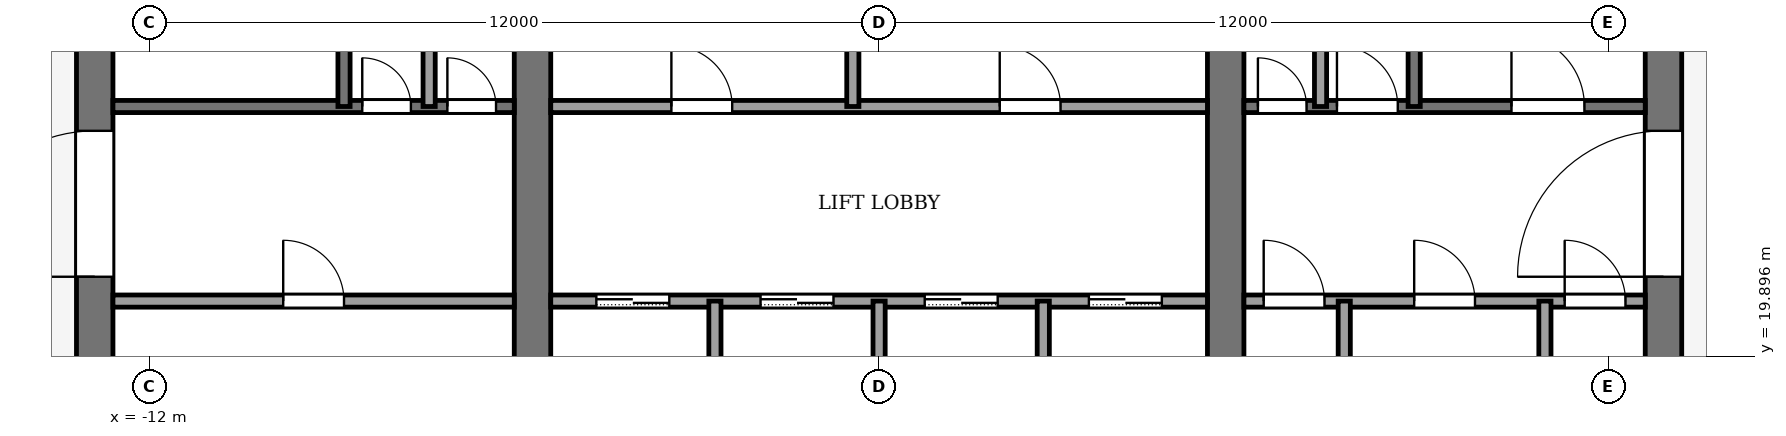
"""IFC4 building model, lengths in metres.
Left out: names, types, materials, properties, quantities, classifications, styles, units other than length and angle.
Written with IfcOpenShell. Run it as: python <this file> out.ifc"""

import sys

from ifc_helpers import new_model, si_unit, direction, frame, frame_2d, origin, place, context, subcontext, project, spatial, rectangle, extrude, element, fill, save


model = new_model("IFC4")
c1 = context("Model", 3, precision=1e-05, world=origin(), true_north=direction((0.0, 1.0)))
c2 = subcontext(c1, "Body", "Model", "MODEL_VIEW")
j1 = project(units=[si_unit("LENGTHUNIT", "METRE"), si_unit("PLANEANGLEUNIT", "RADIAN")], contexts=[c1])
p1 = place(None, origin())
s1 = spatial("IfcSite", under=j1, at=p1, CompositionType="ELEMENT")
p2 = place(p1, origin())
s2 = spatial("IfcBuilding", under=s1, at=p2, CompositionType="ELEMENT")
p3 = place(p2, frame((0.0, 0.0, 322.0)))
s3 = spatial("IfcBuildingStorey", under=s2, at=p3, CompositionType="ELEMENT", Elevation=322.0)
p4 = place(p3, frame((-12.9, 18.4, -0.13), z_axis=(0.0, 0.0, 1.0), x_axis=(0.0, 1.0, 0.0)))
e1 = element("IfcWall", 1, at=p4, inside=s3, PredefinedType="SHEAR", context=c2, shape_type="SweptSolid", body=[
    extrude(rectangle(XDim=19.2, YDim=0.6, at=frame_2d((9.6, 0.0))), origin(), (0.0, 0.0, 1.0), 4.0),
])
p5 = place(p4, frame((2.8, 0.0, 0.13)))
e2 = element("IfcOpeningElement", 2, at=p5, cuts=e1, PredefinedType="OPENING", context=c2, shape_type="SweptSolid", body=[
    extrude(rectangle(XDim=2.4, YDim=2.4, at=frame_2d((1.2, 1.2))), frame((0.0, 0.31, 0.0), z_axis=(0.0, -1.0, 0.0), x_axis=(1.0, 0.0, 0.0)), (0.0, 0.0, 1.0), 0.62),
])
p6 = place(p4, frame((13.4, 0.0, 0.13)))
e3 = element("IfcOpeningElement", 3, at=p6, cuts=e1, PredefinedType="OPENING", context=c2, shape_type="SweptSolid", body=[
    extrude(rectangle(XDim=1.4, YDim=2.2, at=frame_2d((0.7, 1.1))), frame((0.0, 0.31, 0.0), z_axis=(0.0, -1.0, 0.0), x_axis=(1.0, 0.0, 0.0)), (0.0, 0.0, 1.0), 0.62),
])
p7 = place(p3, frame((12.9, 18.4, -0.13), z_axis=(0.0, 0.0, 1.0), x_axis=(0.0, 1.0, 0.0)))
e4 = element("IfcWall", 4, at=p7, inside=s3, PredefinedType="SHEAR", context=c2, shape_type="SweptSolid", body=[
    extrude(rectangle(XDim=19.2, YDim=0.6, at=frame_2d((9.6, 0.0))), origin(), (0.0, 0.0, 1.0), 4.0),
])
p8 = place(p7, frame((2.8, 0.0, 0.13)))
e5 = element("IfcOpeningElement", 5, at=p8, cuts=e4, PredefinedType="OPENING", context=c2, shape_type="SweptSolid", body=[
    extrude(rectangle(XDim=2.4, YDim=2.4, at=frame_2d((1.2, 1.2))), frame((0.0, 0.31, 0.0), z_axis=(0.0, -1.0, 0.0), x_axis=(1.0, 0.0, 0.0)), (0.0, 0.0, 1.0), 0.62),
])
p9 = place(p7, frame((13.3, 0.0, 0.13)))
e6 = element("IfcOpeningElement", 6, at=p9, cuts=e4, PredefinedType="OPENING", context=c2, shape_type="SweptSolid", body=[
    extrude(rectangle(XDim=2.4, YDim=2.4, at=frame_2d((1.2, 1.2))), frame((0.0, 0.31, 0.0), z_axis=(0.0, -1.0, 0.0), x_axis=(1.0, 0.0, 0.0)), (0.0, 0.0, 1.0), 0.62),
])
p10 = place(p3, frame((-5.7, 18.4, -0.13), z_axis=(0.0, 0.0, 1.0), x_axis=(0.0, 1.0, 0.0)))
e7 = element("IfcWall", 7, at=p10, inside=s3, PredefinedType="SHEAR", context=c2, shape_type="SweptSolid", body=[
    extrude(rectangle(XDim=19.2, YDim=0.6, at=frame_2d((9.6, 0.0))), origin(), (0.0, 0.0, 1.0), 4.0),
])
p11 = place(p10, frame((8.35, 0.0, 0.13)))
e8 = element("IfcOpeningElement", 8, at=p11, cuts=e7, PredefinedType="OPENING", context=c2, shape_type="SweptSolid", body=[
    extrude(rectangle(XDim=0.9, YDim=2.1, at=frame_2d((0.45, 1.05))), frame((0.0, 0.31, 0.0), z_axis=(0.0, -1.0, 0.0), x_axis=(1.0, 0.0, 0.0)), (0.0, 0.0, 1.0), 0.62),
])
p12 = place(p3, frame((5.7, 18.4, -0.13), z_axis=(0.0, 0.0, 1.0), x_axis=(0.0, 1.0, 0.0)))
e9 = element("IfcWall", 9, at=p12, inside=s3, PredefinedType="SHEAR", context=c2, shape_type="SweptSolid", body=[
    extrude(rectangle(XDim=19.2, YDim=0.6, at=frame_2d((9.6, 0.0))), origin(), (0.0, 0.0, 1.0), 4.0),
])
p13 = place(p12, frame((13.3, 0.0, 0.13)))
e10 = element("IfcOpeningElement", 10, at=p13, cuts=e9, PredefinedType="OPENING", context=c2, shape_type="SweptSolid", body=[
    extrude(rectangle(XDim=2.4, YDim=2.4, at=frame_2d((1.2, 1.2))), frame((0.0, 0.31, 0.0), z_axis=(0.0, -1.0, 0.0), x_axis=(1.0, 0.0, 0.0)), (0.0, 0.0, 1.0), 0.62),
])
p14 = place(p3, frame((-12.6, 20.8, 0.0), z_axis=(0.0, 0.0, 1.0), x_axis=(1.0, 0.0, 0.0)))
e11 = element("IfcWall", 11, at=p14, inside=s3, PredefinedType="PARTITIONING", context=c2, shape_type="SweptSolid", body=[
    extrude(rectangle(XDim=6.6, YDim=0.2, at=frame_2d((3.3, 0.0))), origin(), (0.0, 0.0, 1.0), 3.87),
])
p15 = place(p14, frame((2.8, 0.0, 0.0)))
e12 = element("IfcOpeningElement", 12, at=p15, cuts=e11, PredefinedType="OPENING", context=c2, shape_type="SweptSolid", body=[
    extrude(rectangle(XDim=1.0, YDim=2.1, at=frame_2d((0.5, 1.05))), frame((0.0, 0.11, 0.0), z_axis=(0.0, -1.0, 0.0), x_axis=(1.0, 0.0, 0.0)), (0.0, 0.0, 1.0), 0.22),
])
p16 = place(p3, frame((-5.4, 20.8, 0.0), z_axis=(0.0, 0.0, 1.0), x_axis=(1.0, 0.0, 0.0)))
e13 = element("IfcWall", 13, at=p16, inside=s3, PredefinedType="PARTITIONING", context=c2, shape_type="SweptSolid", body=[
    extrude(rectangle(XDim=10.8, YDim=0.2, at=frame_2d((5.4, 0.0))), origin(), (0.0, 0.0, 1.0), 3.87),
])
p17 = place(p16, frame((0.75, 0.0, 0.0)))
e14 = element("IfcOpeningElement", 14, at=p17, cuts=e13, PredefinedType="OPENING", context=c2, shape_type="SweptSolid", body=[
    extrude(rectangle(XDim=1.2, YDim=2.2, at=frame_2d((0.6, 1.1))), frame((0.0, 0.11, 0.0), z_axis=(0.0, -1.0, 0.0), x_axis=(1.0, 0.0, 0.0)), (0.0, 0.0, 1.0), 0.22),
])
p18 = place(p16, frame((3.45, 0.0, 0.0)))
e15 = element("IfcOpeningElement", 15, at=p18, cuts=e13, PredefinedType="OPENING", context=c2, shape_type="SweptSolid", body=[
    extrude(rectangle(XDim=1.2, YDim=2.2, at=frame_2d((0.6, 1.1))), frame((0.0, 0.11, 0.0), z_axis=(0.0, -1.0, 0.0), x_axis=(1.0, 0.0, 0.0)), (0.0, 0.0, 1.0), 0.22),
])
p19 = place(p16, frame((6.15, 0.0, 0.0)))
e16 = element("IfcOpeningElement", 16, at=p19, cuts=e13, PredefinedType="OPENING", context=c2, shape_type="SweptSolid", body=[
    extrude(rectangle(XDim=1.2, YDim=2.2, at=frame_2d((0.6, 1.1))), frame((0.0, 0.11, 0.0), z_axis=(0.0, -1.0, 0.0), x_axis=(1.0, 0.0, 0.0)), (0.0, 0.0, 1.0), 0.22),
])
p20 = place(p16, frame((8.85, 0.0, 0.0)))
e17 = element("IfcOpeningElement", 17, at=p20, cuts=e13, PredefinedType="OPENING", context=c2, shape_type="SweptSolid", body=[
    extrude(rectangle(XDim=1.2, YDim=2.2, at=frame_2d((0.6, 1.1))), frame((0.0, 0.11, 0.0), z_axis=(0.0, -1.0, 0.0), x_axis=(1.0, 0.0, 0.0)), (0.0, 0.0, 1.0), 0.22),
])
p21 = place(p3, frame((6.0, 20.8, 0.0), z_axis=(0.0, 0.0, 1.0), x_axis=(1.0, 0.0, 0.0)))
e18 = element("IfcWall", 18, at=p21, inside=s3, PredefinedType="PARTITIONING", context=c2, shape_type="SweptSolid", body=[
    extrude(rectangle(XDim=6.6, YDim=0.2, at=frame_2d((3.3, 0.0))), origin(), (0.0, 0.0, 1.0), 3.87),
])
p22 = place(p21, frame((0.325, 0.0, 0.0)))
e19 = element("IfcOpeningElement", 19, at=p22, cuts=e18, PredefinedType="OPENING", context=c2, shape_type="SweptSolid", body=[
    extrude(rectangle(XDim=1.0, YDim=2.1, at=frame_2d((0.5, 1.05))), frame((0.0, 0.11, 0.0), z_axis=(0.0, -1.0, 0.0), x_axis=(1.0, 0.0, 0.0)), (0.0, 0.0, 1.0), 0.22),
])
p23 = place(p21, frame((2.8, 0.0, 0.0)))
e20 = element("IfcOpeningElement", 20, at=p23, cuts=e18, PredefinedType="OPENING", context=c2, shape_type="SweptSolid", body=[
    extrude(rectangle(XDim=1.0, YDim=2.1, at=frame_2d((0.5, 1.05))), frame((0.0, 0.11, 0.0), z_axis=(0.0, -1.0, 0.0), x_axis=(1.0, 0.0, 0.0)), (0.0, 0.0, 1.0), 0.22),
])
p24 = place(p21, frame((5.275, 0.0, 0.0)))
e21 = element("IfcOpeningElement", 21, at=p24, cuts=e18, PredefinedType="OPENING", context=c2, shape_type="SweptSolid", body=[
    extrude(rectangle(XDim=1.0, YDim=2.1, at=frame_2d((0.5, 1.05))), frame((0.0, 0.11, 0.0), z_axis=(0.0, -1.0, 0.0), x_axis=(1.0, 0.0, 0.0)), (0.0, 0.0, 1.0), 0.22),
])
p25 = place(p3, frame((-12.6, 24.0, 0.0), z_axis=(0.0, 0.0, 1.0), x_axis=(1.0, 0.0, 0.0)))
e22 = element("IfcWall", 22, at=p25, inside=s3, PredefinedType="PARTITIONING", context=c2, shape_type="SweptSolid", body=[
    extrude(rectangle(XDim=6.6, YDim=0.2, at=frame_2d((3.3, 0.0))), origin(), (0.0, 0.0, 1.0), 3.87),
])
p26 = place(p25, frame((4.1, 0.0, 0.0)))
e23 = element("IfcOpeningElement", 23, at=p26, cuts=e22, PredefinedType="OPENING", context=c2, shape_type="SweptSolid", body=[
    extrude(rectangle(XDim=0.8, YDim=2.1, at=frame_2d((0.4, 1.05))), frame((0.0, 0.11, 0.0), z_axis=(0.0, -1.0, 0.0), x_axis=(1.0, 0.0, 0.0)), (0.0, 0.0, 1.0), 0.22),
])
p27 = place(p25, frame((5.5, 0.0, 0.0)))
e24 = element("IfcOpeningElement", 24, at=p27, cuts=e22, PredefinedType="OPENING", context=c2, shape_type="SweptSolid", body=[
    extrude(rectangle(XDim=0.8, YDim=2.1, at=frame_2d((0.4, 1.05))), frame((0.0, 0.11, 0.0), z_axis=(0.0, -1.0, 0.0), x_axis=(1.0, 0.0, 0.0)), (0.0, 0.0, 1.0), 0.22),
])
p28 = place(p3, frame((-5.4, 24.0, 0.0), z_axis=(0.0, 0.0, 1.0), x_axis=(1.0, 0.0, 0.0)))
e25 = element("IfcWall", 25, at=p28, inside=s3, PredefinedType="PARTITIONING", context=c2, shape_type="SweptSolid", body=[
    extrude(rectangle(XDim=10.8, YDim=0.2, at=frame_2d((5.4, 0.0))), origin(), (0.0, 0.0, 1.0), 3.87),
])
p29 = place(p28, frame((1.984, 0.0, 0.0)))
e26 = element("IfcOpeningElement", 26, at=p29, cuts=e25, PredefinedType="OPENING", context=c2, shape_type="SweptSolid", body=[
    extrude(rectangle(XDim=1.0, YDim=2.1, at=frame_2d((0.5, 1.05))), frame((0.0, 0.11, 0.0), z_axis=(0.0, -1.0, 0.0), x_axis=(1.0, 0.0, 0.0)), (0.0, 0.0, 1.0), 0.22),
])
p30 = place(p28, frame((7.384, 0.0, 0.0)))
e27 = element("IfcOpeningElement", 27, at=p30, cuts=e25, PredefinedType="OPENING", context=c2, shape_type="SweptSolid", body=[
    extrude(rectangle(XDim=1.0, YDim=2.1, at=frame_2d((0.5, 1.05))), frame((0.0, 0.11, 0.0), z_axis=(0.0, -1.0, 0.0), x_axis=(1.0, 0.0, 0.0)), (0.0, 0.0, 1.0), 0.22),
])
p31 = place(p3, frame((6.0, 24.0, 0.0), z_axis=(0.0, 0.0, 1.0), x_axis=(1.0, 0.0, 0.0)))
e28 = element("IfcWall", 28, at=p31, inside=s3, PredefinedType="PARTITIONING", context=c2, shape_type="SweptSolid", body=[
    extrude(rectangle(XDim=6.6, YDim=0.2, at=frame_2d((3.3, 0.0))), origin(), (0.0, 0.0, 1.0), 3.87),
])
p32 = place(p31, frame((0.23, 0.0, 0.0)))
e29 = element("IfcOpeningElement", 29, at=p32, cuts=e28, PredefinedType="OPENING", context=c2, shape_type="SweptSolid", body=[
    extrude(rectangle(XDim=0.8, YDim=2.1, at=frame_2d((0.4, 1.05))), frame((0.0, 0.11, 0.0), z_axis=(0.0, -1.0, 0.0), x_axis=(1.0, 0.0, 0.0)), (0.0, 0.0, 1.0), 0.22),
])
p33 = place(p31, frame((1.53, 0.0, 0.0)))
e30 = element("IfcOpeningElement", 30, at=p33, cuts=e28, PredefinedType="OPENING", context=c2, shape_type="SweptSolid", body=[
    extrude(rectangle(XDim=1.0, YDim=2.1, at=frame_2d((0.5, 1.05))), frame((0.0, 0.11, 0.0), z_axis=(0.0, -1.0, 0.0), x_axis=(1.0, 0.0, 0.0)), (0.0, 0.0, 1.0), 0.22),
])
p34 = place(p31, frame((4.4, 0.0, 0.0)))
e31 = element("IfcOpeningElement", 31, at=p34, cuts=e28, PredefinedType="OPENING", context=c2, shape_type="SweptSolid", body=[
    extrude(rectangle(XDim=1.2, YDim=2.2, at=frame_2d((0.6, 1.1))), frame((0.0, 0.11, 0.0), z_axis=(0.0, -1.0, 0.0), x_axis=(1.0, 0.0, 0.0)), (0.0, 0.0, 1.0), 0.22),
])
for number, where, z_axis, x_axis in (
    (32, (-8.8, 24.0, 0.0), (0.0, 0.0, 1.0), (0.0, 1.0, 0.0)),
    (33, (-7.4, 24.0, 0.0), (0.0, 0.0, 1.0), (0.0, 1.0, 0.0)),
):
    element("IfcWall", number, at=place(p3, frame(where, z_axis=z_axis, x_axis=x_axis)), inside=s3, PredefinedType="PARTITIONING", context=c2, shape_type="SweptSolid", body=[
        extrude(rectangle(XDim=7.4, YDim=0.2, at=frame_2d((3.7, 0.0))), origin(), (0.0, 0.0, 1.0), 3.87),
    ])
p35 = place(p3, frame((-2.7, 18.4, 0.0), z_axis=(0.0, 0.0, 1.0), x_axis=(0.0, 1.0, 0.0)))
e34 = element("IfcWall", 34, at=p35, inside=s3, PredefinedType="PARTITIONING", context=c2, shape_type="SweptSolid", body=[
    extrude(rectangle(XDim=2.4, YDim=0.2, at=frame_2d((1.2, 0.0))), origin(), (0.0, 0.0, 1.0), 3.87),
])
p36 = place(p3, frame((-0.432, 24.0, 0.0), z_axis=(0.0, 0.0, 1.0), x_axis=(0.0, 1.0, 0.0)))
e35 = element("IfcWall", 35, at=p36, inside=s3, PredefinedType="PARTITIONING", context=c2, shape_type="SweptSolid", body=[
    extrude(rectangle(XDim=2.4, YDim=0.2, at=frame_2d((1.2, 0.0))), origin(), (0.0, 0.0, 1.0), 3.87),
])
for number, where, z_axis, x_axis in (
    (36, (0.0, 18.4, 0.0), (0.0, 0.0, 1.0), (0.0, 1.0, 0.0)),
    (37, (2.7, 18.4, 0.0), (0.0, 0.0, 1.0), (0.0, 1.0, 0.0)),
):
    element("IfcWall", number, at=place(p3, frame(where, z_axis=z_axis, x_axis=x_axis)), inside=s3, PredefinedType="PARTITIONING", context=c2, shape_type="SweptSolid", body=[
        extrude(rectangle(XDim=2.4, YDim=0.2, at=frame_2d((1.2, 0.0))), origin(), (0.0, 0.0, 1.0), 3.87),
    ])
p37 = place(p3, frame((7.26, 24.0, 0.0), z_axis=(0.0, 0.0, 1.0), x_axis=(0.0, 1.0, 0.0)))
e38 = element("IfcWall", 38, at=p37, inside=s3, PredefinedType="PARTITIONING", context=c2, shape_type="SweptSolid", body=[
    extrude(rectangle(XDim=7.4, YDim=0.2, at=frame_2d((3.7, 0.0))), origin(), (0.0, 0.0, 1.0), 3.87),
])
p38 = place(p3, frame((7.65, 18.4, 0.0), z_axis=(0.0, 0.0, 1.0), x_axis=(0.0, 1.0, 0.0)))
e39 = element("IfcWall", 39, at=p38, inside=s3, PredefinedType="PARTITIONING", context=c2, shape_type="SweptSolid", body=[
    extrude(rectangle(XDim=2.4, YDim=0.2, at=frame_2d((1.2, 0.0))), origin(), (0.0, 0.0, 1.0), 3.87),
])
p39 = place(p3, frame((8.8, 24.0, 0.0), z_axis=(0.0, 0.0, 1.0), x_axis=(0.0, 1.0, 0.0)))
e40 = element("IfcWall", 40, at=p39, inside=s3, PredefinedType="PARTITIONING", context=c2, shape_type="SweptSolid", body=[
    extrude(rectangle(XDim=7.4, YDim=0.2, at=frame_2d((3.7, 0.0))), origin(), (0.0, 0.0, 1.0), 3.87),
])
p40 = place(p3, frame((10.95, 18.4, 0.0), z_axis=(0.0, 0.0, 1.0), x_axis=(0.0, 1.0, 0.0)))
e41 = element("IfcWall", 41, at=p40, inside=s3, PredefinedType="PARTITIONING", context=c2, shape_type="SweptSolid", body=[
    extrude(rectangle(XDim=2.4, YDim=0.2, at=frame_2d((1.2, 0.0))), origin(), (0.0, 0.0, 1.0), 3.87),
])
p41 = place(p17, origin())
e42 = element("IfcDoor", 42, at=p41, inside=s3, OperationType="SLIDING_TO_LEFT", PredefinedType="DOOR", context=c2, shape_type="SweptSolid", body=[
    extrude(rectangle(XDim=1.2, YDim=2.2, at=frame_2d((0.6, 1.1))), frame((0.0, 0.025, 0.0), z_axis=(0.0, -1.0, 0.0), x_axis=(1.0, 0.0, 0.0)), (0.0, 0.0, 1.0), 0.05),
])
fill(e14, e42)
p42 = place(p18, origin())
e43 = element("IfcDoor", 43, at=p42, inside=s3, OperationType="SLIDING_TO_LEFT", PredefinedType="DOOR", context=c2, shape_type="SweptSolid", body=[
    extrude(rectangle(XDim=1.2, YDim=2.2, at=frame_2d((0.6, 1.1))), frame((0.0, 0.025, 0.0), z_axis=(0.0, -1.0, 0.0), x_axis=(1.0, 0.0, 0.0)), (0.0, 0.0, 1.0), 0.05),
])
fill(e15, e43)
p43 = place(p19, origin())
e44 = element("IfcDoor", 44, at=p43, inside=s3, OperationType="SLIDING_TO_LEFT", PredefinedType="DOOR", context=c2, shape_type="SweptSolid", body=[
    extrude(rectangle(XDim=1.2, YDim=2.2, at=frame_2d((0.6, 1.1))), frame((0.0, 0.025, 0.0), z_axis=(0.0, -1.0, 0.0), x_axis=(1.0, 0.0, 0.0)), (0.0, 0.0, 1.0), 0.05),
])
fill(e16, e44)
p44 = place(p20, origin())
e45 = element("IfcDoor", 45, at=p44, inside=s3, OperationType="SLIDING_TO_LEFT", PredefinedType="DOOR", context=c2, shape_type="SweptSolid", body=[
    extrude(rectangle(XDim=1.2, YDim=2.2, at=frame_2d((0.6, 1.1))), frame((0.0, 0.025, 0.0), z_axis=(0.0, -1.0, 0.0), x_axis=(1.0, 0.0, 0.0)), (0.0, 0.0, 1.0), 0.05),
])
fill(e17, e45)
p45 = place(p29, origin())
e46 = element("IfcDoor", 46, at=p45, inside=s3, OperationType="SINGLE_SWING_LEFT", PredefinedType="DOOR", context=c2, shape_type="SweptSolid", body=[
    extrude(rectangle(XDim=1.0, YDim=2.1, at=frame_2d((0.5, 1.05))), frame((0.0, 0.025, 0.0), z_axis=(0.0, -1.0, 0.0), x_axis=(1.0, 0.0, 0.0)), (0.0, 0.0, 1.0), 0.05),
])
fill(e26, e46)
p46 = place(p30, origin())
e47 = element("IfcDoor", 47, at=p46, inside=s3, OperationType="SINGLE_SWING_RIGHT", PredefinedType="DOOR", context=c2, shape_type="SweptSolid", body=[
    extrude(rectangle(XDim=1.0, YDim=2.1, at=frame_2d((0.5, 1.05))), frame((0.0, 0.025, 0.0), z_axis=(0.0, -1.0, 0.0), x_axis=(1.0, 0.0, 0.0)), (0.0, 0.0, 1.0), 0.05),
])
fill(e27, e47)
p47 = place(p15, origin())
e48 = element("IfcDoor", 48, at=p47, inside=s3, OperationType="SINGLE_SWING_LEFT", PredefinedType="DOOR", context=c2, shape_type="SweptSolid", body=[
    extrude(rectangle(XDim=1.0, YDim=2.1, at=frame_2d((0.5, 1.05))), frame((0.0, 0.025, 0.0), z_axis=(0.0, -1.0, 0.0), x_axis=(1.0, 0.0, 0.0)), (0.0, 0.0, 1.0), 0.05),
])
fill(e12, e48)
p48 = place(p22, origin())
e49 = element("IfcDoor", 49, at=p48, inside=s3, OperationType="SINGLE_SWING_LEFT", PredefinedType="DOOR", context=c2, shape_type="SweptSolid", body=[
    extrude(rectangle(XDim=1.0, YDim=2.1, at=frame_2d((0.5, 1.05))), frame((0.0, 0.025, 0.0), z_axis=(0.0, -1.0, 0.0), x_axis=(1.0, 0.0, 0.0)), (0.0, 0.0, 1.0), 0.05),
])
fill(e19, e49)
p49 = place(p23, origin())
e50 = element("IfcDoor", 50, at=p49, inside=s3, OperationType="SINGLE_SWING_LEFT", PredefinedType="DOOR", context=c2, shape_type="SweptSolid", body=[
    extrude(rectangle(XDim=1.0, YDim=2.1, at=frame_2d((0.5, 1.05))), frame((0.0, 0.025, 0.0), z_axis=(0.0, -1.0, 0.0), x_axis=(1.0, 0.0, 0.0)), (0.0, 0.0, 1.0), 0.05),
])
fill(e20, e50)
p50 = place(p24, origin())
e51 = element("IfcDoor", 51, at=p50, inside=s3, OperationType="SINGLE_SWING_LEFT", PredefinedType="DOOR", context=c2, shape_type="SweptSolid", body=[
    extrude(rectangle(XDim=1.0, YDim=2.1, at=frame_2d((0.5, 1.05))), frame((0.0, 0.025, 0.0), z_axis=(0.0, -1.0, 0.0), x_axis=(1.0, 0.0, 0.0)), (0.0, 0.0, 1.0), 0.05),
])
fill(e21, e51)
p51 = place(p26, origin())
e52 = element("IfcDoor", 52, at=p51, inside=s3, OperationType="SINGLE_SWING_LEFT", PredefinedType="DOOR", context=c2, shape_type="SweptSolid", body=[
    extrude(rectangle(XDim=0.8, YDim=2.1, at=frame_2d((0.4, 1.05))), frame((0.0, 0.025, 0.0), z_axis=(0.0, -1.0, 0.0), x_axis=(1.0, 0.0, 0.0)), (0.0, 0.0, 1.0), 0.05),
])
fill(e23, e52)
p52 = place(p27, origin())
e53 = element("IfcDoor", 53, at=p52, inside=s3, OperationType="SINGLE_SWING_RIGHT", PredefinedType="DOOR", context=c2, shape_type="SweptSolid", body=[
    extrude(rectangle(XDim=0.8, YDim=2.1, at=frame_2d((0.4, 1.05))), frame((0.0, 0.025, 0.0), z_axis=(0.0, -1.0, 0.0), x_axis=(1.0, 0.0, 0.0)), (0.0, 0.0, 1.0), 0.05),
])
fill(e24, e53)
p53 = place(p32, origin())
e54 = element("IfcDoor", 54, at=p53, inside=s3, OperationType="SINGLE_SWING_RIGHT", PredefinedType="DOOR", context=c2, shape_type="SweptSolid", body=[
    extrude(rectangle(XDim=0.8, YDim=2.1, at=frame_2d((0.4, 1.05))), frame((0.0, 0.025, 0.0), z_axis=(0.0, -1.0, 0.0), x_axis=(1.0, 0.0, 0.0)), (0.0, 0.0, 1.0), 0.05),
])
fill(e29, e54)
p54 = place(p33, origin())
e55 = element("IfcDoor", 55, at=p54, inside=s3, OperationType="SINGLE_SWING_LEFT", PredefinedType="DOOR", context=c2, shape_type="SweptSolid", body=[
    extrude(rectangle(XDim=1.0, YDim=2.1, at=frame_2d((0.5, 1.05))), frame((0.0, 0.025, 0.0), z_axis=(0.0, -1.0, 0.0), x_axis=(1.0, 0.0, 0.0)), (0.0, 0.0, 1.0), 0.05),
])
fill(e30, e55)
p55 = place(p34, origin())
e56 = element("IfcDoor", 56, at=p55, inside=s3, OperationType="SINGLE_SWING_LEFT", PredefinedType="DOOR", context=c2, shape_type="SweptSolid", body=[
    extrude(rectangle(XDim=1.2, YDim=2.2, at=frame_2d((0.6, 1.1))), frame((0.0, 0.025, 0.0), z_axis=(0.0, -1.0, 0.0), x_axis=(1.0, 0.0, 0.0)), (0.0, 0.0, 1.0), 0.05),
])
fill(e31, e56)
p56 = place(p5, origin())
e57 = element("IfcDoor", 57, at=p56, inside=s3, OperationType="DOUBLE_DOOR_SINGLE_SWING", PredefinedType="DOOR", context=c2, shape_type="SweptSolid", body=[
    extrude(rectangle(XDim=2.4, YDim=2.4, at=frame_2d((1.2, 1.2))), frame((0.0, 0.025, 0.0), z_axis=(0.0, -1.0, 0.0), x_axis=(1.0, 0.0, 0.0)), (0.0, 0.0, 1.0), 0.05),
])
fill(e2, e57)
p57 = place(p8, origin())
e58 = element("IfcDoor", 58, at=p57, inside=s3, OperationType="DOUBLE_DOOR_SINGLE_SWING", PredefinedType="DOOR", context=c2, shape_type="SweptSolid", body=[
    extrude(rectangle(XDim=2.4, YDim=2.4, at=frame_2d((1.2, 1.2))), frame((0.0, 0.025, 0.0), z_axis=(0.0, -1.0, 0.0), x_axis=(1.0, 0.0, 0.0)), (0.0, 0.0, 1.0), 0.05),
])
fill(e5, e58)
save(model, sys.argv[1])
